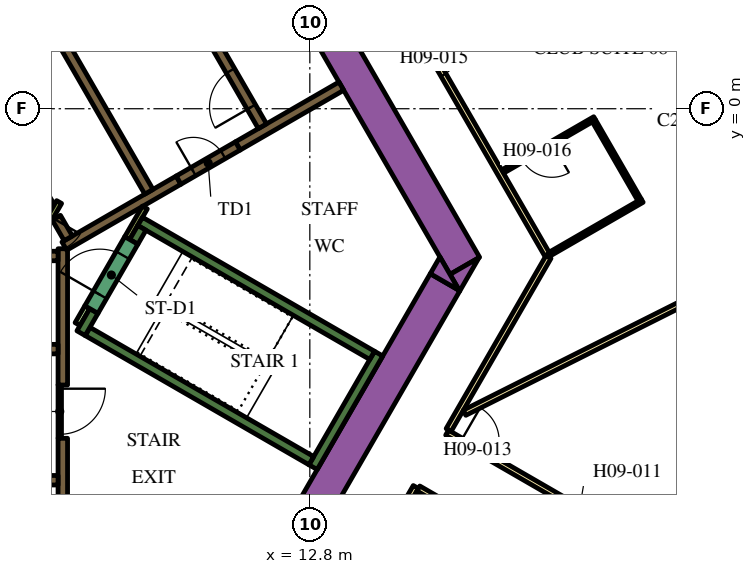
"""IFC4 building model, lengths in metres.
Left out: names, types, materials, properties, quantities, classifications, styles, units other than length and angle.
Written with IfcOpenShell. Run it as: python <this file> out.ifc"""

import sys

from ifc_helpers import new_model, si_unit, direction, frame, frame_2d, origin, place, context, subcontext, project, spatial, polyline, rectangle, outline, extrude, element, fill, save


model = new_model("IFC4")
c1 = context("Model", 3, precision=1e-05, world=origin(), true_north=direction((0.0, 1.0)))
c2 = subcontext(c1, "Body", "Model", "MODEL_VIEW")
j1 = project(units=[si_unit("LENGTHUNIT", "METRE"), si_unit("PLANEANGLEUNIT", "RADIAN")], contexts=[c1])
p1 = place(None, origin())
s1 = spatial("IfcSite", under=j1, at=p1, CompositionType="ELEMENT")
p2 = place(p1, origin())
s2 = spatial("IfcBuilding", under=s1, at=p2, CompositionType="ELEMENT")
p3 = place(p2, frame((0.0, 0.0, 122.7)))
s3 = spatial("IfcBuildingStorey", under=s2, at=p3, CompositionType="ELEMENT", Elevation=122.7)
p4 = place(p3, frame((6.776, 13.364, 0.0), z_axis=(0.0, 0.0, 1.0), x_axis=(0.500004177138, -0.8660229921, 0.0)))
e1 = element("IfcWall", 1, at=p4, inside=s3, PredefinedType="SOLIDWALL", context=c2, shape_type="SweptSolid", body=[
    extrude(rectangle(XDim=20.204, YDim=0.9, at=frame_2d((10.102, 0.0))), origin(), (0.0, 0.0, 1.0), 3.9),
])
p5 = place(p3, origin())
e2 = element("IfcWall", 2, at=p5, inside=s3, PredefinedType="SOLIDWALL", context=c2, shape_type="SweptSolid", body=[
    extrude(outline(polyline([(16.743, -4.8), (16.489, -4.36), (17.251, -3.92), (16.743, -4.8)])), origin(), (0.0, 0.0, 1.0), 3.9),
])
p6 = place(p3, frame((11.943, -12.214, 0.0), z_axis=(0.0, 0.0, 1.0), x_axis=(0.49998092645, 0.866036415623, 0.0)))
e3 = element("IfcWall", 3, at=p6, inside=s3, PredefinedType="SOLIDWALL", context=c2, shape_type="SweptSolid", body=[
    extrude(rectangle(XDim=8.83, YDim=0.9, at=frame_2d((4.415, 0.0))), origin(), (0.0, 0.0, 1.0), 3.9),
])
e4 = element("IfcWall", 4, at=p5, inside=s3, PredefinedType="SOLIDWALL", context=c2, shape_type="SweptSolid", body=[
    extrude(outline(polyline([(16.223, -3.9), (16.732, -4.78), (15.969, -4.34), (16.223, -3.9)])), origin(), (0.0, 0.0, 1.0), 3.9),
])
p7 = place(p3, frame((12.885, -9.431, 0.0), z_axis=(0.0, 0.0, 1.0), x_axis=(0.500020560727, 0.866013532718, 0.0)))
e5 = element("IfcWall", 5, at=p7, inside=s3, PredefinedType="SOLIDWALL", context=c2, shape_type="SweptSolid", body=[
    extrude(rectangle(XDim=3.45, YDim=0.25, at=frame_2d((1.725, 0.0))), origin(), (0.0, 0.0, 1.0), 3.9),
])
p8 = place(p3, frame((12.84, -9.261, 0.0), z_axis=(0.0, 0.0, 1.0), x_axis=(-0.866013990052, 0.500019768644, 0.0)))
e6 = element("IfcWall", 6, at=p8, inside=s3, PredefinedType="SOLIDWALL", context=c2, shape_type="SweptSolid", body=[
    extrude(rectangle(XDim=6.8, YDim=0.25, at=frame_2d((3.4, 0.0))), origin(), (0.0, 0.0, 1.0), 3.9),
])
p9 = place(p3, frame((6.78, -5.906, 0.0), z_axis=(0.0, 0.0, 1.0), x_axis=(0.500223362819, 0.865896406789, 0.0)))
e7 = element("IfcWall", 7, at=p9, inside=s3, PredefinedType="SOLIDWALL", context=c2, shape_type="SweptSolid", body=[
    extrude(rectangle(XDim=0.675, YDim=0.25, at=frame_2d((0.337, 0.0))), origin(), (0.0, 0.0, 1.0), 3.9),
])
p10 = place(p3, frame((8.334, -2.964, 0.0), z_axis=(0.0, 0.0, 1.0), x_axis=(0.866016039709, -0.500016218704, 0.0)))
e8 = element("IfcWall", 8, at=p10, inside=s3, PredefinedType="SOLIDWALL", context=c2, shape_type="SweptSolid", body=[
    extrude(rectangle(XDim=7.05, YDim=0.25, at=frame_2d((3.525, 0.0))), origin(), (0.0, 0.0, 1.0), 3.9),
])
p11 = place(p3, frame((8.168, -3.503, 0.0), z_axis=(0.0, 0.0, 1.0), x_axis=(0.49972245349, 0.866185586049, 0.0)))
e9 = element("IfcWall", 9, at=p11, inside=s3, PredefinedType="SOLIDWALL", context=c2, shape_type="SweptSolid", body=[
    extrude(rectangle(XDim=0.425, YDim=0.25, at=frame_2d((0.212, 0.0))), origin(), (0.0, 0.0, 1.0), 3.9),
])
p12 = place(p3, frame((6.3, -7.27, 0.0), z_axis=(0.0, 0.0, 1.0), x_axis=(0.0, 1.0, 0.0)))
e10 = element("IfcWall", 10, at=p12, inside=s3, PredefinedType="SOLIDWALL", context=c2, shape_type="SweptSolid", body=[
    extrude(rectangle(XDim=3.586, YDim=0.25, at=frame_2d((1.793, 0.0))), origin(), (0.0, 0.0, 1.0), 3.9),
])
p13 = place(p3, frame((6.3, -12.1, 0.0), z_axis=(0.0, 0.0, 1.0), x_axis=(0.0, 1.0, 0.0)))
e11 = element("IfcWall", 11, at=p13, inside=s3, PredefinedType="SOLIDWALL", context=c2, shape_type="SweptSolid", body=[
    extrude(rectangle(XDim=3.428, YDim=0.25, at=frame_2d((1.714, 0.0))), origin(), (0.0, 0.0, 1.0), 3.9),
])
p14 = place(p3, frame((5.538, -3.875, 0.0), z_axis=(0.0, 0.0, 1.0), x_axis=(1.0, 0.0, 0.0)))
e12 = element("IfcWall", 12, at=p14, inside=s3, PredefinedType="SOLIDWALL", context=c2, shape_type="SweptSolid", body=[
    extrude(rectangle(XDim=0.637, YDim=0.25, at=frame_2d((0.318, 0.0))), origin(), (0.0, 0.0, 1.0), 3.9),
])
p15 = place(p3, frame((13.629, 0.594, 0.0), z_axis=(0.0, 0.0, 1.0), x_axis=(-0.86602790099, -0.499995674689, 0.0)))
e13 = element("IfcWall", 13, at=p15, inside=s3, PredefinedType="SOLIDWALL", context=c2, shape_type="SweptSolid", body=[
    extrude(rectangle(XDim=3.146, YDim=0.25, at=frame_2d((1.573, 0.0))), origin(), (0.0, 0.0, 1.0), 3.9),
])
p16 = place(p3, frame((9.346, -1.879, 0.0), z_axis=(0.0, 0.0, 1.0), x_axis=(-0.866048528039, -0.499959945477, 0.0)))
e14 = element("IfcWall", 14, at=p16, inside=s3, PredefinedType="SOLIDWALL", context=c2, shape_type="SweptSolid", body=[
    extrude(rectangle(XDim=3.47, YDim=0.25, at=frame_2d((1.735, 0.0))), origin(), (0.0, 0.0, 1.0), 3.9),
])
p17 = place(p3, frame((6.13, -2.867, 0.0), z_axis=(0.0, 0.0, 1.0), x_axis=(0.500160776593, -0.865932559475, 0.0)))
e15 = element("IfcWall", 15, at=p17, inside=s3, PredefinedType="SOLIDWALL", context=c2, shape_type="SweptSolid", body=[
    extrude(rectangle(XDim=0.627, YDim=0.25, at=frame_2d((0.313, 0.0))), origin(), (0.0, 0.0, 1.0), 3.9),
])
p18 = place(p3, frame((5.97, -2.591, 0.0), z_axis=(0.0, 0.0, 1.0), x_axis=(-0.499994469932, 0.866028596547, 0.0)))
e16 = element("IfcWall", 16, at=p18, inside=s3, PredefinedType="SOLIDWALL", context=c2, shape_type="SweptSolid", body=[
    extrude(rectangle(XDim=10.488, YDim=0.25, at=frame_2d((5.244, 0.0))), origin(), (0.0, 0.0, 1.0), 3.9),
])
p19 = place(p3, frame((6.945, -5.222, 0.0), z_axis=(0.0, 0.0, 1.0), x_axis=(-0.499818422106, -0.866130212453, 0.0)))
e17 = element("IfcWall", 17, at=p19, inside=s3, PredefinedType="PARTITIONING", context=c2, shape_type="SweptSolid", body=[
    extrude(rectangle(XDim=0.514, YDim=0.15, at=frame_2d((0.257, 0.0))), origin(), (0.0, 0.0, 1.0), 2.75),
])
p20 = place(p3, frame((8.459, -2.599, 0.0), z_axis=(0.0, 0.0, 1.0), x_axis=(-0.500041054325, -0.866001699761, 0.0)))
e18 = element("IfcWall", 18, at=p20, inside=s3, PredefinedType="PARTITIONING", context=c2, shape_type="SweptSolid", body=[
    extrude(rectangle(XDim=0.929, YDim=0.15, at=frame_2d((0.464, 0.0))), origin(), (0.0, 0.0, 1.0), 3.9),
])
p21 = place(p3, frame((-6.175, -9.775, 0.0), z_axis=(0.0, 0.0, 1.0), x_axis=(1.0, 0.0, 0.0)))
e19 = element("IfcWall", 19, at=p21, inside=s3, PredefinedType="SOLIDWALL", context=c2, shape_type="SweptSolid", body=[
    extrude(rectangle(XDim=12.35, YDim=0.25, at=frame_2d((6.175, 0.0))), origin(), (0.0, 0.0, 1.0), 3.9),
])
p22 = place(p21, frame((0.585, 0.0, 0.0)))
e20 = element("IfcOpeningElement", 20, at=p22, cuts=e19, PredefinedType="OPENING", context=c2, shape_type="SweptSolid", body=[
    extrude(rectangle(XDim=1.1, YDim=2.1, at=frame_2d((0.55, 1.05))), frame((0.0, 0.135, 0.0), z_axis=(0.0, -1.0, 0.0), x_axis=(1.0, 0.0, 0.0)), (0.0, 0.0, 1.0), 0.27),
])
p23 = place(p21, frame((3.105, 0.0, 0.0)))
e21 = element("IfcOpeningElement", 21, at=p23, cuts=e19, PredefinedType="OPENING", context=c2, shape_type="SweptSolid", body=[
    extrude(rectangle(XDim=1.1, YDim=2.1, at=frame_2d((0.55, 1.05))), frame((0.0, 0.135, 0.0), z_axis=(0.0, -1.0, 0.0), x_axis=(1.0, 0.0, 0.0)), (0.0, 0.0, 1.0), 0.27),
])
p24 = place(p21, frame((5.625, 0.0, 0.0)))
e22 = element("IfcOpeningElement", 22, at=p24, cuts=e19, PredefinedType="OPENING", context=c2, shape_type="SweptSolid", body=[
    extrude(rectangle(XDim=1.1, YDim=2.1, at=frame_2d((0.55, 1.05))), frame((0.0, 0.135, 0.0), z_axis=(0.0, -1.0, 0.0), x_axis=(1.0, 0.0, 0.0)), (0.0, 0.0, 1.0), 0.27),
])
p25 = place(p21, frame((8.145, 0.0, 0.0)))
e23 = element("IfcOpeningElement", 23, at=p25, cuts=e19, PredefinedType="OPENING", context=c2, shape_type="SweptSolid", body=[
    extrude(rectangle(XDim=1.1, YDim=2.1, at=frame_2d((0.55, 1.05))), frame((0.0, 0.135, 0.0), z_axis=(0.0, -1.0, 0.0), x_axis=(1.0, 0.0, 0.0)), (0.0, 0.0, 1.0), 0.27),
])
p26 = place(p21, frame((10.665, 0.0, 0.0)))
e24 = element("IfcOpeningElement", 24, at=p26, cuts=e19, PredefinedType="OPENING", context=c2, shape_type="SweptSolid", body=[
    extrude(rectangle(XDim=1.1, YDim=2.1, at=frame_2d((0.55, 1.05))), frame((0.0, 0.135, 0.0), z_axis=(0.0, -1.0, 0.0), x_axis=(1.0, 0.0, 0.0)), (0.0, 0.0, 1.0), 0.27),
])
p27 = place(p3, frame((-6.175, -6.325, 0.0), z_axis=(0.0, 0.0, 1.0), x_axis=(1.0, 0.0, 0.0)))
e25 = element("IfcWall", 25, at=p27, inside=s3, PredefinedType="SOLIDWALL", context=c2, shape_type="SweptSolid", body=[
    extrude(rectangle(XDim=12.35, YDim=0.25, at=frame_2d((6.175, 0.0))), origin(), (0.0, 0.0, 1.0), 3.9),
])
p28 = place(p27, frame((3.205, 0.0, 0.0)))
e26 = element("IfcOpeningElement", 26, at=p28, cuts=e25, PredefinedType="OPENING", context=c2, shape_type="SweptSolid", body=[
    extrude(rectangle(XDim=0.9, YDim=2.1, at=frame_2d((0.45, 1.05))), frame((0.0, 0.135, 0.0), z_axis=(0.0, -1.0, 0.0), x_axis=(1.0, 0.0, 0.0)), (0.0, 0.0, 1.0), 0.27),
])
p29 = place(p27, frame((8.145, 0.0, 0.0)))
e27 = element("IfcOpeningElement", 27, at=p29, cuts=e25, PredefinedType="OPENING", context=c2, shape_type="SweptSolid", body=[
    extrude(rectangle(XDim=1.1, YDim=2.1, at=frame_2d((0.55, 1.05))), frame((0.0, 0.135, 0.0), z_axis=(0.0, -1.0, 0.0), x_axis=(1.0, 0.0, 0.0)), (0.0, 0.0, 1.0), 0.27),
])
p30 = place(p27, frame((10.665, 0.0, 0.0)))
e28 = element("IfcOpeningElement", 28, at=p30, cuts=e25, PredefinedType="OPENING", context=c2, shape_type="SweptSolid", body=[
    extrude(rectangle(XDim=1.1, YDim=2.1, at=frame_2d((0.55, 1.05))), frame((0.0, 0.135, 0.0), z_axis=(0.0, -1.0, 0.0), x_axis=(1.0, 0.0, 0.0)), (0.0, 0.0, 1.0), 0.27),
])
p31 = place(p3, frame((11.553, -0.46, 0.0), z_axis=(0.0, 0.0, 1.0), x_axis=(-0.500006514828, 0.866021642414, 0.0)))
e29 = element("IfcWall", 29, at=p31, inside=s3, PredefinedType="SOLIDWALL", context=c2, shape_type="SweptSolid", body=[
    extrude(rectangle(XDim=12.35, YDim=0.25, at=frame_2d((6.175, 0.0))), origin(), (0.0, 0.0, 1.0), 3.9),
])
p32 = place(p31, frame((0.585, 0.0, 0.0)))
e30 = element("IfcOpeningElement", 30, at=p32, cuts=e29, PredefinedType="OPENING", context=c2, shape_type="SweptSolid", body=[
    extrude(rectangle(XDim=1.1, YDim=2.1, at=frame_2d((0.55, 1.05))), frame((0.0, 0.135, 0.0), z_axis=(0.0, -1.0, 0.0), x_axis=(1.0, 0.0, 0.0)), (0.0, 0.0, 1.0), 0.27),
])
p33 = place(p31, frame((3.105, 0.0, 0.0)))
e31 = element("IfcOpeningElement", 31, at=p33, cuts=e29, PredefinedType="OPENING", context=c2, shape_type="SweptSolid", body=[
    extrude(rectangle(XDim=1.1, YDim=2.1, at=frame_2d((0.55, 1.05))), frame((0.0, 0.135, 0.0), z_axis=(0.0, -1.0, 0.0), x_axis=(1.0, 0.0, 0.0)), (0.0, 0.0, 1.0), 0.27),
])
p34 = place(p31, frame((5.625, 0.0, 0.0)))
e32 = element("IfcOpeningElement", 32, at=p34, cuts=e29, PredefinedType="OPENING", context=c2, shape_type="SweptSolid", body=[
    extrude(rectangle(XDim=1.1, YDim=2.1, at=frame_2d((0.55, 1.05))), frame((0.0, 0.135, 0.0), z_axis=(0.0, -1.0, 0.0), x_axis=(1.0, 0.0, 0.0)), (0.0, 0.0, 1.0), 0.27),
])
p35 = place(p3, frame((8.565, -2.185, 0.0), z_axis=(0.0, 0.0, 1.0), x_axis=(-0.499997954832, 0.866026584559, 0.0)))
e33 = element("IfcWall", 33, at=p35, inside=s3, PredefinedType="SOLIDWALL", context=c2, shape_type="SweptSolid", body=[
    extrude(rectangle(XDim=12.35, YDim=0.25, at=frame_2d((6.175, 0.0))), origin(), (0.0, 0.0, 1.0), 3.9),
])
p36 = place(p35, frame((5.725, 0.0, 0.0)))
e34 = element("IfcOpeningElement", 34, at=p36, cuts=e33, PredefinedType="OPENING", context=c2, shape_type="SweptSolid", body=[
    extrude(rectangle(XDim=0.9, YDim=2.1, at=frame_2d((0.45, 1.05))), frame((0.0, 0.135, 0.0), z_axis=(0.0, -1.0, 0.0), x_axis=(1.0, 0.0, 0.0)), (0.0, 0.0, 1.0), 0.27),
])
p37 = place(p3, frame((7.053, -5.284, 0.0), z_axis=(0.0, 0.0, 1.0), x_axis=(0.500078061341, 0.865980330357, 0.0)))
e35 = element("IfcWall", 35, at=p37, inside=s3, PredefinedType="SOLIDWALL", context=c2, shape_type="SweptSolid", body=[
    extrude(rectangle(XDim=2.1, YDim=0.4, at=frame_2d((1.05, 0.0))), origin(), (0.0, 0.0, 1.0), 3.9),
])
p38 = place(p37, frame((0.45, 0.0, 0.0)))
e36 = element("IfcOpeningElement", 36, at=p38, cuts=e35, PredefinedType="OPENING", context=c2, shape_type="SweptSolid", body=[
    extrude(rectangle(XDim=1.2, YDim=2.1, at=frame_2d((0.6, 1.05))), frame((0.0, 0.21, 0.0), z_axis=(0.0, -1.0, 0.0), x_axis=(1.0, 0.0, 0.0)), (0.0, 0.0, 1.0), 0.42),
])
p39 = place(p3, frame((9.346, -1.879, 0.0), z_axis=(0.0, 0.0, 1.0), x_axis=(0.866047807691, 0.499961193289, 0.0)))
e37 = element("IfcWall", 37, at=p39, inside=s3, PredefinedType="SOLIDWALL", context=c2, shape_type="SweptSolid", body=[
    extrude(rectangle(XDim=1.8, YDim=0.25, at=frame_2d((0.9, 0.0))), origin(), (0.0, 0.0, 1.0), 3.9),
])
p40 = place(p39, frame((0.45, 0.0, 0.0)))
e38 = element("IfcOpeningElement", 38, at=p40, cuts=e37, PredefinedType="OPENING", context=c2, shape_type="SweptSolid", body=[
    extrude(rectangle(XDim=0.9, YDim=2.1, at=frame_2d((0.45, 1.05))), frame((0.0, 0.135, 0.0), z_axis=(0.0, -1.0, 0.0), x_axis=(1.0, 0.0, 0.0)), (0.0, 0.0, 1.0), 0.27),
])
p41 = place(p3, frame((6.203, -2.456, 0.0), z_axis=(0.0, 0.0, 1.0), x_axis=(-0.500043961785, -0.866000020948, 0.0)))
e39 = element("IfcWall", 39, at=p41, inside=s3, PredefinedType="PARTITIONING", context=c2, shape_type="SweptSolid", body=[
    extrude(rectangle(XDim=1.95, YDim=0.15, at=frame_2d((0.975, 0.0))), origin(), (0.0, 0.0, 1.0), 3.9),
])
p42 = place(p41, frame((0.45, 0.0, 0.0)))
e40 = element("IfcOpeningElement", 40, at=p42, cuts=e39, PredefinedType="OPENING", context=c2, shape_type="SweptSolid", body=[
    extrude(rectangle(XDim=0.9, YDim=2.1, at=frame_2d((0.45, 1.05))), frame((0.0, 0.085, 0.0), z_axis=(0.0, -1.0, 0.0), x_axis=(1.0, 0.0, 0.0)), (0.0, 0.0, 1.0), 0.17),
])
p43 = place(p3, frame((6.22, -7.266, 0.0), z_axis=(0.0, 0.0, 1.0), x_axis=(0.0, -1.0, 0.0)))
e41 = element("IfcWall", 41, at=p43, inside=s3, PredefinedType="PARTITIONING", context=c2, shape_type="SweptSolid", body=[
    extrude(rectangle(XDim=1.4, YDim=0.09, at=frame_2d((0.7, 0.0))), origin(), (0.0, 0.0, 1.0), 2.75),
])
p44 = place(p43, frame((0.1, 0.0, 0.0)))
e42 = element("IfcOpeningElement", 42, at=p44, cuts=e41, PredefinedType="OPENING", context=c2, shape_type="SweptSolid", body=[
    extrude(rectangle(XDim=1.2, YDim=2.1, at=frame_2d((0.6, 1.05))), frame((0.0, 0.055, 0.0), z_axis=(0.0, -1.0, 0.0), x_axis=(1.0, 0.0, 0.0)), (0.0, 0.0, 1.0), 0.11),
])
p45 = place(p3, frame((16.412, -8.523, 0.0), z_axis=(0.0, 0.0, 1.0), x_axis=(0.866025629663, -0.499999608766, 0.0)))
e43 = element("IfcWall", 43, at=p45, inside=s3, PredefinedType="PARTITIONING", context=c2, shape_type="SweptSolid", body=[
    extrude(rectangle(XDim=13.624, YDim=0.15, at=frame_2d((6.812, 0.0))), origin(), (0.0, 0.0, 1.0), 2.75),
])
p46 = place(p45, frame((0.426, 0.0, 0.0)))
e44 = element("IfcOpeningElement", 44, at=p46, cuts=e43, PredefinedType="OPENING", context=c2, shape_type="SweptSolid", body=[
    extrude(rectangle(XDim=1.0, YDim=2.1, at=frame_2d((0.5, 1.05))), frame((0.0, 0.085, 0.0), z_axis=(0.0, -1.0, 0.0), x_axis=(1.0, 0.0, 0.0)), (0.0, 0.0, 1.0), 0.17),
])
p47 = place(p3, frame((19.081, -3.9, 0.0), z_axis=(0.0, 0.0, 1.0), x_axis=(-0.499974327079, -0.866040225545, 0.0)))
e45 = element("IfcWall", 45, at=p47, inside=s3, PredefinedType="PARTITIONING", context=c2, shape_type="SweptSolid", body=[
    extrude(rectangle(XDim=5.258, YDim=0.15, at=frame_2d((2.629, 0.0))), origin(), (0.0, 0.0, 1.0), 2.75),
])
p48 = place(p3, frame((6.163, 18.475, 0.0), z_axis=(0.0, 0.0, 1.0), x_axis=(0.500001317485, -0.866024643133, 0.0)))
e46 = element("IfcWall", 46, at=p48, inside=s3, PredefinedType="PARTITIONING", context=c2, shape_type="SweptSolid", body=[
    extrude(rectangle(XDim=25.767, YDim=0.15, at=frame_2d((12.883, 0.0))), origin(), (0.0, 0.0, 1.0), 2.75),
])
p49 = place(p48, frame((19.306, 0.0, 0.0)))
e47 = element("IfcOpeningElement", 47, at=p49, cuts=e46, PredefinedType="OPENING", context=c2, shape_type="SweptSolid", body=[
    extrude(rectangle(XDim=1.0, YDim=2.1, at=frame_2d((0.5, 1.05))), frame((0.0, 0.085, 0.0), z_axis=(0.0, -1.0, 0.0), x_axis=(1.0, 0.0, 0.0)), (0.0, 0.0, 1.0), 0.17),
])
p50 = place(p48, frame((17.999, 0.0, 0.0)))
e48 = element("IfcOpeningElement", 48, at=p50, cuts=e46, PredefinedType="OPENING", context=c2, shape_type="SweptSolid", body=[
    extrude(rectangle(XDim=1.0, YDim=2.1, at=frame_2d((0.5, 1.05))), frame((0.0, 0.085, 0.0), z_axis=(0.0, -1.0, 0.0), x_axis=(1.0, 0.0, 0.0)), (0.0, 0.0, 1.0), 0.17),
])
p51 = place(p48, frame((0.596, 0.0, 0.0)))
e49 = element("IfcOpeningElement", 49, at=p51, cuts=e46, PredefinedType="OPENING", context=c2, shape_type="SweptSolid", body=[
    extrude(rectangle(XDim=1.0, YDim=2.1, at=frame_2d((0.5, 1.05))), frame((0.0, 0.085, 0.0), z_axis=(0.0, -1.0, 0.0), x_axis=(1.0, 0.0, 0.0)), (0.0, 0.0, 1.0), 0.17),
])
p52 = place(p3, frame((15.587, -9.952, 0.0), z_axis=(0.0, 0.0, 1.0), x_axis=(-0.500016618951, -0.866015808616, 0.0)))
e50 = element("IfcWall", 50, at=p52, inside=s3, PredefinedType="PARTITIONING", context=c2, shape_type="SweptSolid", body=[
    extrude(rectangle(XDim=5.268, YDim=0.15, at=frame_2d((2.634, 0.0))), origin(), (0.0, 0.0, 1.0), 2.75),
])
p53 = place(p52, frame((4.088, 0.0, 0.0)))
e51 = element("IfcOpeningElement", 51, at=p53, cuts=e50, PredefinedType="OPENING", context=c2, shape_type="SweptSolid", body=[
    extrude(rectangle(XDim=1.0, YDim=2.1, at=frame_2d((0.5, 1.05))), frame((0.0, 0.085, 0.0), z_axis=(0.0, -1.0, 0.0), x_axis=(1.0, 0.0, 0.0)), (0.0, 0.0, 1.0), 0.17),
])
p54 = place(p3, frame((27.386, -16.764, 0.0), z_axis=(0.0, 0.0, 1.0), x_axis=(-0.866022585856, 0.500004880763, 0.0)))
e52 = element("IfcWall", 52, at=p54, inside=s3, PredefinedType="PARTITIONING", context=c2, shape_type="SweptSolid", body=[
    extrude(rectangle(XDim=13.544, YDim=0.15, at=frame_2d((6.772, 0.0))), origin(), (0.0, 0.0, 1.0), 2.75),
])
p55 = place(p54, frame((8.491, 0.0, 0.0)))
e53 = element("IfcOpeningElement", 53, at=p55, cuts=e52, PredefinedType="OPENING", context=c2, shape_type="SweptSolid", body=[
    extrude(rectangle(XDim=1.0, YDim=2.1, at=frame_2d((0.5, 1.05))), frame((0.0, 0.085, 0.0), z_axis=(0.0, -1.0, 0.0), x_axis=(1.0, 0.0, 0.0)), (0.0, 0.0, 1.0), 0.17),
])
p56 = place(p3, frame((26.591, -3.122, 0.0), z_axis=(0.0, 0.0, 1.0), x_axis=(-0.893766213273, -0.448533115847, 0.0)))
e54 = element("IfcWall", 54, at=p56, inside=s3, PredefinedType="PARTITIONING", context=c2, shape_type="SweptSolid", body=[
    extrude(rectangle(XDim=10.875, YDim=0.15, at=frame_2d((5.438, 0.0))), origin(), (0.0, 0.0, 1.0), 2.75),
])
p57 = place(p3, frame((20.296, -0.254, 0.0), z_axis=(0.0, 0.0, 1.0), x_axis=(-0.866034573852, -0.49998411664, 0.0)))
e55 = element("IfcWall", 55, at=p57, inside=s3, PredefinedType="PARTITIONING", context=c2, shape_type="SweptSolid", body=[
    extrude(rectangle(XDim=2.8, YDim=0.1, at=frame_2d((1.4, 0.0))), origin(), (0.0, 0.0, 1.0), 2.75),
])
p58 = place(p57, frame((1.3, 0.0, 0.0)))
e56 = element("IfcOpeningElement", 56, at=p58, cuts=e55, PredefinedType="OPENING", context=c2, shape_type="SweptSolid", body=[
    extrude(rectangle(XDim=0.9, YDim=2.1, at=frame_2d((0.45, 1.05))), frame((0.0, 0.06, 0.0), z_axis=(0.0, -1.0, 0.0), x_axis=(1.0, 0.0, 0.0)), (0.0, 0.0, 1.0), 0.12),
])
p59 = place(p3, frame((20.278, -0.323, 0.0), z_axis=(0.0, 0.0, 1.0), x_axis=(0.500001309137, -0.866024647952, 0.0)))
e57 = element("IfcWall", 57, at=p59, inside=s3, PredefinedType="PARTITIONING", context=c2, shape_type="SweptSolid", body=[
    extrude(rectangle(XDim=2.4, YDim=0.1, at=frame_2d((1.2, 0.0))), origin(), (0.0, 0.0, 1.0), 2.75),
])
p60 = place(p3, frame((19.121, -3.819, 0.0), z_axis=(0.0, 0.0, 1.0), x_axis=(0.866034573852, 0.49998411664, 0.0)))
e58 = element("IfcWall", 58, at=p60, inside=s3, PredefinedType="PARTITIONING", context=c2, shape_type="SweptSolid", body=[
    extrude(rectangle(XDim=2.8, YDim=0.1, at=frame_2d((1.4, 0.0))), origin(), (0.0, 0.0, 1.0), 2.75),
])
p61 = place(p32, origin())
e59 = element("IfcDoor", 59, at=p61, inside=s3, OperationType="DOUBLE_DOOR_SLIDING", PredefinedType="DOOR", context=c2, shape_type="SweptSolid", body=[
    extrude(rectangle(XDim=1.1, YDim=2.1, at=frame_2d((0.55, 1.05))), frame((0.0, 0.025, 0.0), z_axis=(0.0, -1.0, 0.0), x_axis=(1.0, 0.0, 0.0)), (0.0, 0.0, 1.0), 0.05),
])
fill(e30, e59)
p62 = place(p38, origin())
e60 = element("IfcDoor", 60, at=p62, inside=s3, OperationType="SINGLE_SWING_LEFT", PredefinedType="DOOR", context=c2, shape_type="SweptSolid", body=[
    extrude(rectangle(XDim=1.2, YDim=2.1, at=frame_2d((0.6, 1.05))), frame((0.0, 0.025, 0.0), z_axis=(0.0, -1.0, 0.0), x_axis=(1.0, 0.0, 0.0)), (0.0, 0.0, 1.0), 0.05),
])
fill(e36, e60)
p63 = place(p40, origin())
e61 = element("IfcDoor", 61, at=p63, inside=s3, OperationType="SINGLE_SWING_LEFT", PredefinedType="DOOR", context=c2, shape_type="SweptSolid", body=[
    extrude(rectangle(XDim=0.9, YDim=2.1, at=frame_2d((0.45, 1.05))), frame((0.0, 0.025, 0.0), z_axis=(0.0, -1.0, 0.0), x_axis=(1.0, 0.0, 0.0)), (0.0, 0.0, 1.0), 0.05),
])
fill(e38, e61)
p64 = place(p44, origin())
e62 = element("IfcDoor", 62, at=p64, inside=s3, OperationType="SINGLE_SWING_LEFT", PredefinedType="DOOR", context=c2, shape_type="SweptSolid", body=[
    extrude(rectangle(XDim=1.2, YDim=2.1, at=frame_2d((0.6, 1.05))), frame((0.0, 0.025, 0.0), z_axis=(0.0, -1.0, 0.0), x_axis=(1.0, 0.0, 0.0)), (0.0, 0.0, 1.0), 0.05),
])
fill(e42, e62)
p65 = place(p46, origin())
e63 = element("IfcDoor", 63, at=p65, inside=s3, OperationType="SINGLE_SWING_LEFT", PredefinedType="DOOR", context=c2, shape_type="SweptSolid", body=[
    extrude(rectangle(XDim=1.0, YDim=2.1, at=frame_2d((0.5, 1.05))), frame((0.0, 0.025, 0.0), z_axis=(0.0, -1.0, 0.0), x_axis=(1.0, 0.0, 0.0)), (0.0, 0.0, 1.0), 0.05),
])
fill(e44, e63)
p66 = place(p49, origin())
e64 = element("IfcDoor", 64, at=p66, inside=s3, OperationType="SINGLE_SWING_LEFT", PredefinedType="DOOR", context=c2, shape_type="SweptSolid", body=[
    extrude(rectangle(XDim=1.0, YDim=2.1, at=frame_2d((0.5, 1.05))), frame((0.0, 0.025, 0.0), z_axis=(0.0, -1.0, 0.0), x_axis=(1.0, 0.0, 0.0)), (0.0, 0.0, 1.0), 0.05),
])
fill(e47, e64)
p67 = place(p58, origin())
e65 = element("IfcDoor", 65, at=p67, inside=s3, OperationType="SINGLE_SWING_LEFT", PredefinedType="DOOR", context=c2, shape_type="SweptSolid", body=[
    extrude(rectangle(XDim=0.9, YDim=2.1, at=frame_2d((0.45, 1.05))), frame((0.0, 0.025, 0.0), z_axis=(0.0, -1.0, 0.0), x_axis=(1.0, 0.0, 0.0)), (0.0, 0.0, 1.0), 0.05),
])
fill(e56, e65)
save(model, sys.argv[1])
